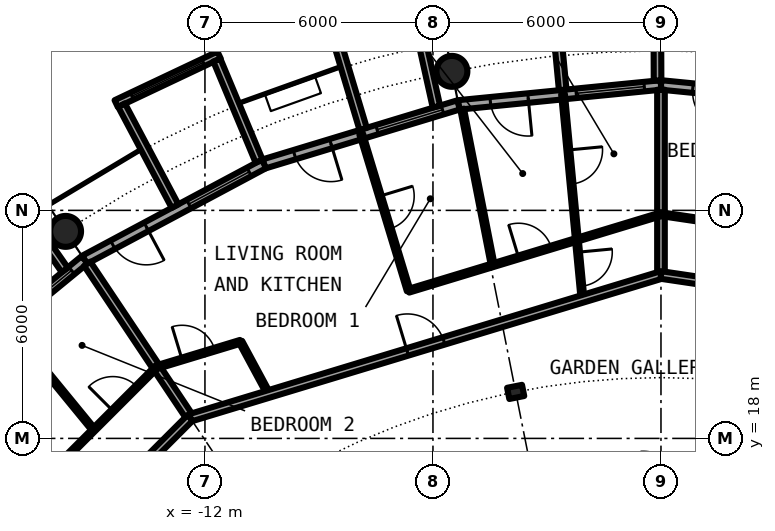
"""IFC4 building model, lengths in metres.
Left out: names, types, materials, properties, quantities, classifications, styles, units other than length and angle.
Written with IfcOpenShell. Run it as: python <this file> out.ifc"""

import sys

from ifc_helpers import new_model, si_unit, direction, frame, frame_2d, origin, origin_2d, place, context, subcontext, project, spatial, rectangle, circle, hollow_circle, i_section, extrude, element, fill, save


model = new_model("IFC4")
c1 = context("Model", 3, precision=1e-05, world=origin(), true_north=direction((0.0, 1.0)))
c2 = subcontext(c1, "Body", "Model", "MODEL_VIEW")
j1 = project(units=[si_unit("LENGTHUNIT", "METRE"), si_unit("PLANEANGLEUNIT", "RADIAN")], contexts=[c1])
p1 = place(None, origin())
s1 = spatial("IfcSite", under=j1, at=p1, CompositionType="ELEMENT")
p2 = place(p1, origin())
s2 = spatial("IfcBuilding", under=s1, at=p2, CompositionType="ELEMENT")
p3 = place(p2, frame((0.0, 0.0, 202.4)))
s3 = spatial("IfcBuildingStorey", under=s2, at=p3, CompositionType="ELEMENT", Elevation=202.4)
for number, where, z_axis, x_axis in (
    (1, (-5.501, 27.658, 0.0), (0.0, 0.0, 1.0), (1.0, 0.0, 0.0)),
    (2, (-15.667, 23.448, 0.0), (0.0, 0.0, 1.0), (1.0, 0.0, 0.0)),
):
    element("IfcColumn", number, at=place(p3, frame(where, z_axis=z_axis, x_axis=x_axis)), inside=s3, PredefinedType="COLUMN", context=c2, shape_type="SweptSolid", body=[
        extrude(hollow_circle(Radius=0.406, WallThickness=0.03, at=origin_2d()), origin(), (0.0, 0.0, 1.0), 3.05),
    ])
p4 = place(p3, frame((-3.824, 19.223, 0.0), z_axis=(0.0, 0.0, 1.0), x_axis=(-0.195090322016, 0.980785280403, 0.0)))
e3 = element("IfcColumn", 3, at=p4, inside=s3, PredefinedType="COLUMN", context=c2, shape_type="SweptSolid", body=[
    extrude(i_section(OverallWidth=0.3, OverallDepth=0.4, WebThickness=0.013, FlangeThickness=0.024, FilletRadius=0.027, at=origin_2d()), origin(), (0.0, 0.0, 1.0), 3.05),
])
p5 = place(p3, frame((5.326, 26.775, 0.0), z_axis=(0.0, 0.0, 1.0), x_axis=(-0.995173996315, 0.098126026407, 0.0)))
e4 = element("IfcWall", 4, at=p5, inside=s3, PredefinedType="SOLIDWALL", context=c2, shape_type="SweptSolid", body=[
    extrude(rectangle(XDim=5.352, YDim=0.25, at=frame_2d((2.676, 0.0))), origin(), (0.0, 0.0, 1.0), 2.7),
])
p6 = place(p5, frame((0.441, 0.0, 0.3)))
e5 = element("IfcOpeningElement", 5, at=p6, cuts=e4, PredefinedType="OPENING", context=c2, shape_type="SweptSolid", body=[
    extrude(rectangle(XDim=1.8, YDim=2.1, at=frame_2d((0.9, 1.05))), frame((0.0, 0.135, 0.0), z_axis=(0.0, -1.0, 0.0), x_axis=(1.0, 0.0, 0.0)), (0.0, 0.0, 1.0), 0.27),
])
p7 = place(p5, frame((3.51, 0.0, 0.0)))
e6 = element("IfcOpeningElement", 6, at=p7, cuts=e4, PredefinedType="OPENING", context=c2, shape_type="SweptSolid", body=[
    extrude(rectangle(XDim=1.0, YDim=2.2, at=frame_2d((0.5, 1.1))), frame((0.0, 0.135, 0.0), z_axis=(0.0, -1.0, 0.0), x_axis=(1.0, 0.0, 0.0)), (0.0, 0.0, 1.0), 0.27),
])
p8 = place(p3, frame((0.0, 27.3, 0.0), z_axis=(0.0, 0.0, 1.0), x_axis=(-0.995173996315, -0.098126026407, 0.0)))
e7 = element("IfcWall", 7, at=p8, inside=s3, PredefinedType="SOLIDWALL", context=c2, shape_type="SweptSolid", body=[
    extrude(rectangle(XDim=5.352, YDim=0.25, at=frame_2d((2.676, 0.0))), origin(), (0.0, 0.0, 1.0), 2.7),
])
p9 = place(p8, frame((0.441, 0.0, 0.3)))
e8 = element("IfcOpeningElement", 8, at=p9, cuts=e7, PredefinedType="OPENING", context=c2, shape_type="SweptSolid", body=[
    extrude(rectangle(XDim=1.8, YDim=2.1, at=frame_2d((0.9, 1.05))), frame((0.0, 0.135, 0.0), z_axis=(0.0, -1.0, 0.0), x_axis=(1.0, 0.0, 0.0)), (0.0, 0.0, 1.0), 0.27),
])
p10 = place(p8, frame((3.51, 0.0, 0.0)))
e9 = element("IfcOpeningElement", 9, at=p10, cuts=e7, PredefinedType="OPENING", context=c2, shape_type="SweptSolid", body=[
    extrude(rectangle(XDim=1.0, YDim=2.2, at=frame_2d((0.5, 1.1))), frame((0.0, 0.135, 0.0), z_axis=(0.0, -1.0, 0.0), x_axis=(1.0, 0.0, 0.0)), (0.0, 0.0, 1.0), 0.27),
])
p11 = place(p3, frame((-0.09, 27.417, -0.03), z_axis=(0.0, 0.0, 1.0), x_axis=(-0.00347308367, 0.999993968827, 0.0)))
e10 = element("IfcWall", 10, at=p11, inside=s3, PredefinedType="SOLIDWALL", context=c2, shape_type="SweptSolid", body=[
    extrude(rectangle(XDim=2.882, YDim=0.2, at=frame_2d((1.441, 0.0))), origin(), (0.0, 0.0, 1.0), 2.73),
])
p12 = place(p3, frame((-2.586, 27.171, -0.03), z_axis=(0.0, 0.0, 1.0), x_axis=(-0.094548432284, 0.995520262954, 0.0)))
e11 = element("IfcWall", 11, at=p12, inside=s3, PredefinedType="SOLIDWALL", context=c2, shape_type="SweptSolid", body=[
    extrude(rectangle(XDim=3.006, YDim=0.2, at=frame_2d((1.503, 0.0))), origin(), (0.0, 0.0, 1.0), 2.73),
])
p13 = place(p3, frame((-5.326, 26.775, 0.0), z_axis=(0.0, 0.0, 1.0), x_axis=(-0.956965678721, -0.290201119486, 0.0)))
e12 = element("IfcWall", 12, at=p13, inside=s3, PredefinedType="SOLIDWALL", context=c2, shape_type="SweptSolid", body=[
    extrude(rectangle(XDim=5.351, YDim=0.25, at=frame_2d((2.676, 0.0))), origin(), (0.0, 0.0, 1.0), 2.7),
])
p14 = place(p13, frame((0.441, 0.0, 0.3)))
e13 = element("IfcOpeningElement", 13, at=p14, cuts=e12, PredefinedType="OPENING", context=c2, shape_type="SweptSolid", body=[
    extrude(rectangle(XDim=1.8, YDim=2.1, at=frame_2d((0.9, 1.05))), frame((0.0, 0.135, 0.0), z_axis=(0.0, -1.0, 0.0), x_axis=(1.0, 0.0, 0.0)), (0.0, 0.0, 1.0), 0.27),
])
p15 = place(p13, frame((3.51, 0.0, 0.0)))
e14 = element("IfcOpeningElement", 14, at=p15, cuts=e12, PredefinedType="OPENING", context=c2, shape_type="SweptSolid", body=[
    extrude(rectangle(XDim=1.0, YDim=2.2, at=frame_2d((0.5, 1.1))), frame((0.0, 0.135, 0.0), z_axis=(0.0, -1.0, 0.0), x_axis=(1.0, 0.0, 0.0)), (0.0, 0.0, 1.0), 0.27),
])
p16 = place(p3, frame((-5.909, 26.729, -0.03), z_axis=(0.0, 0.0, 1.0), x_axis=(-0.216409053917, 0.976302781612, 0.0)))
e15 = element("IfcWall", 15, at=p16, inside=s3, PredefinedType="SOLIDWALL", context=c2, shape_type="SweptSolid", body=[
    extrude(rectangle(XDim=2.925, YDim=0.2, at=frame_2d((1.463, 0.0))), origin(), (0.0, 0.0, 1.0), 2.73),
])
p17 = place(p3, frame((-7.837, 26.144, -0.03), z_axis=(0.0, 0.0, 1.0), x_axis=(-0.287064767992, 0.957911174889, 0.0)))
e16 = element("IfcWall", 16, at=p17, inside=s3, PredefinedType="SOLIDWALL", context=c2, shape_type="SweptSolid", body=[
    extrude(rectangle(XDim=3.006, YDim=0.2, at=frame_2d((1.503, 0.0))), origin(), (0.0, 0.0, 1.0), 2.73),
])
p18 = place(p3, frame((-10.447, 25.222, 0.0), z_axis=(0.0, 0.0, 1.0), x_axis=(-0.881915646801, -0.471407246368, 0.0)))
e17 = element("IfcWall", 17, at=p18, inside=s3, PredefinedType="SOLIDWALL", context=c2, shape_type="SweptSolid", body=[
    extrude(rectangle(XDim=5.352, YDim=0.25, at=frame_2d((2.676, 0.0))), origin(), (0.0, 0.0, 1.0), 2.7),
])
p19 = place(p18, frame((0.441, 0.0, 0.3)))
e18 = element("IfcOpeningElement", 18, at=p19, cuts=e17, PredefinedType="OPENING", context=c2, shape_type="SweptSolid", body=[
    extrude(rectangle(XDim=1.8, YDim=2.1, at=frame_2d((0.9, 1.05))), frame((0.0, 0.135, 0.0), z_axis=(0.0, -1.0, 0.0), x_axis=(1.0, 0.0, 0.0)), (0.0, 0.0, 1.0), 0.27),
])
p20 = place(p18, frame((3.51, 0.0, 0.0)))
e19 = element("IfcOpeningElement", 19, at=p20, cuts=e17, PredefinedType="OPENING", context=c2, shape_type="SweptSolid", body=[
    extrude(rectangle(XDim=1.0, YDim=2.2, at=frame_2d((0.5, 1.1))), frame((0.0, 0.135, 0.0), z_axis=(0.0, -1.0, 0.0), x_axis=(1.0, 0.0, 0.0)), (0.0, 0.0, 1.0), 0.27),
])
p21 = place(p3, frame((-11.629, 28.088, -0.03), z_axis=(0.0, 0.0, 1.0), x_axis=(-0.904000060331, -0.427532327342, 0.0)))
e20 = element("IfcWall", 20, at=p21, inside=s3, PredefinedType="SOLIDWALL", context=c2, shape_type="SweptSolid", body=[
    extrude(rectangle(XDim=2.993, YDim=0.2, at=frame_2d((1.497, 0.0))), origin(), (0.0, 0.0, 1.0), 2.73),
])
p22 = place(p21, frame((0.457, 0.0, 0.33)))
e21 = element("IfcOpeningElement", 21, at=p22, cuts=e20, PredefinedType="OPENING", context=c2, shape_type="SweptSolid", body=[
    extrude(circle(Radius=1.04, at=frame_2d((1.04, 1.04))), frame((0.0, 0.11, 0.0), z_axis=(0.0, -1.0, 0.0), x_axis=(1.0, 0.0, 0.0)), (0.0, 0.0, 1.0), 0.22),
])
p23 = place(p3, frame((-10.575, 25.295, -0.03), z_axis=(0.0, 0.0, 1.0), x_axis=(-0.385697364644, 0.922625353492, 0.0)))
e22 = element("IfcWall", 22, at=p23, inside=s3, PredefinedType="SOLIDWALL", context=c2, shape_type="SweptSolid", body=[
    extrude(rectangle(XDim=2.883, YDim=0.2, at=frame_2d((1.442, 0.0))), origin(), (0.0, 0.0, 1.0), 2.73),
])
p24 = place(p3, frame((-12.787, 24.113, -0.03), z_axis=(0.0, 0.0, 1.0), x_axis=(-0.468365282436, 0.883534924159, 0.0)))
e23 = element("IfcWall", 23, at=p24, inside=s3, PredefinedType="SOLIDWALL", context=c2, shape_type="SweptSolid", body=[
    extrude(rectangle(XDim=3.006, YDim=0.2, at=frame_2d((1.503, 0.0))), origin(), (0.0, 0.0, 1.0), 2.73),
])
p25 = place(p3, frame((-15.167, 22.699, 0.0), z_axis=(0.0, 0.0, 1.0), x_axis=(-0.773019449054, -0.634382322723, 0.0)))
e24 = element("IfcWall", 24, at=p25, inside=s3, PredefinedType="SOLIDWALL", context=c2, shape_type="SweptSolid", body=[
    extrude(rectangle(XDim=5.352, YDim=0.25, at=frame_2d((2.676, 0.0))), origin(), (0.0, 0.0, 1.0), 2.7),
])
p26 = place(p25, frame((0.441, 0.0, 0.3)))
e25 = element("IfcOpeningElement", 25, at=p26, cuts=e24, PredefinedType="OPENING", context=c2, shape_type="SweptSolid", body=[
    extrude(rectangle(XDim=1.8, YDim=2.1, at=frame_2d((0.9, 1.05))), frame((0.0, 0.135, 0.0), z_axis=(0.0, -1.0, 0.0), x_axis=(1.0, 0.0, 0.0)), (0.0, 0.0, 1.0), 0.27),
])
p27 = place(p25, frame((3.51, 0.0, 0.0)))
e26 = element("IfcOpeningElement", 26, at=p27, cuts=e24, PredefinedType="OPENING", context=c2, shape_type="SweptSolid", body=[
    extrude(rectangle(XDim=1.0, YDim=2.2, at=frame_2d((0.5, 1.1))), frame((0.0, 0.135, 0.0), z_axis=(0.0, -1.0, 0.0), x_axis=(1.0, 0.0, 0.0)), (0.0, 0.0, 1.0), 0.27),
])
p28 = place(p3, frame((-15.688, 22.433, -0.03), z_axis=(0.0, 0.0, 1.0), x_axis=(-0.573260687834, 0.819373043115, 0.0)))
e27 = element("IfcWall", 27, at=p28, inside=s3, PredefinedType="SOLIDWALL", context=c2, shape_type="SweptSolid", body=[
    extrude(rectangle(XDim=2.925, YDim=0.2, at=frame_2d((1.463, 0.0))), origin(), (0.0, 0.0, 1.0), 2.73),
])
p29 = place(p3, frame((-17.22, 21.023, 0.0), z_axis=(0.0, 0.0, 1.0), x_axis=(0.633737383709, -0.773548271597, 0.0)))
e28 = element("IfcWall", 28, at=p29, inside=s3, PredefinedType="PARTITIONING", context=c2, shape_type="SweptSolid", body=[
    extrude(rectangle(XDim=3.618, YDim=0.1, at=frame_2d((1.809, 0.0))), origin(), (0.0, 0.0, 1.0), 2.7),
])
p30 = place(p3, frame((-15.098, 22.595, 0.0), z_axis=(0.0, 0.0, 1.0), x_axis=(0.55569370664, -0.831387096605, 0.0)))
e29 = element("IfcWall", 29, at=p30, inside=s3, PredefinedType="PARTITIONING", context=c2, shape_type="SweptSolid", body=[
    extrude(rectangle(XDim=4.875, YDim=0.2, at=frame_2d((2.438, 0.0))), origin(), (0.0, 0.0, 1.0), 2.7),
])
p31 = place(p3, frame((-7.888, 26.005, 0.0), z_axis=(0.0, 0.0, 1.0), x_axis=(0.290193157742, -0.956968093094, 0.0)))
e30 = element("IfcWall", 30, at=p31, inside=s3, PredefinedType="PARTITIONING", context=c2, shape_type="SweptSolid", body=[
    extrude(rectangle(XDim=4.304, YDim=0.1, at=frame_2d((2.152, 0.0))), origin(), (0.0, 0.0, 1.0), 2.7),
])
p32 = place(p31, frame((1.702, 0.0, 0.0)))
e31 = element("IfcOpeningElement", 31, at=p32, cuts=e30, PredefinedType="OPENING", context=c2, shape_type="SweptSolid", body=[
    extrude(rectangle(XDim=0.9, YDim=2.3, at=frame_2d((0.45, 1.15))), frame((0.0, 0.06, 0.0), z_axis=(0.0, -1.0, 0.0), x_axis=(1.0, 0.0, 0.0)), (0.0, 0.0, 1.0), 0.12),
])
p33 = place(p3, frame((-5.232, 26.667, 0.0), z_axis=(0.0, 0.0, 1.0), x_axis=(0.192415561348, -0.981313533867, 0.0)))
e32 = element("IfcWall", 32, at=p33, inside=s3, PredefinedType="PARTITIONING", context=c2, shape_type="SweptSolid", body=[
    extrude(rectangle(XDim=4.188, YDim=0.1, at=frame_2d((2.094, 0.0))), origin(), (0.0, 0.0, 1.0), 2.7),
])
p34 = place(p3, frame((-2.577, 27.053, 0.0), z_axis=(0.0, 0.0, 1.0), x_axis=(0.094751520537, -0.99550095397, 0.0)))
e33 = element("IfcWall", 33, at=p34, inside=s3, PredefinedType="PARTITIONING", context=c2, shape_type="SweptSolid", body=[
    extrude(rectangle(XDim=5.403, YDim=0.1, at=frame_2d((2.702, 0.0))), origin(), (0.0, 0.0, 1.0), 2.7),
])
p35 = place(p34, frame((4.172, 0.0, 0.0)))
e34 = element("IfcOpeningElement", 34, at=p35, cuts=e33, PredefinedType="OPENING", context=c2, shape_type="SweptSolid", body=[
    extrude(rectangle(XDim=0.9, YDim=2.3, at=frame_2d((0.45, 1.15))), frame((0.0, 0.06, 0.0), z_axis=(0.0, -1.0, 0.0), x_axis=(1.0, 0.0, 0.0)), (0.0, 0.0, 1.0), 0.12),
])
p36 = place(p34, frame((1.471, 0.0, 0.0)))
e35 = element("IfcOpeningElement", 35, at=p36, cuts=e33, PredefinedType="OPENING", context=c2, shape_type="SweptSolid", body=[
    extrude(rectangle(XDim=0.9, YDim=2.3, at=frame_2d((0.45, 1.15))), frame((0.0, 0.06, 0.0), z_axis=(0.0, -1.0, 0.0), x_axis=(1.0, 0.0, 0.0)), (0.0, 0.0, 1.0), 0.12),
])
p37 = place(p3, frame((0.0, 22.3, 0.0), z_axis=(0.0, 0.0, 1.0), x_axis=(0.0, 1.0, 0.0)))
e36 = element("IfcWall", 36, at=p37, inside=s3, PredefinedType="PARTITIONING", context=c2, shape_type="SweptSolid", body=[
    extrude(rectangle(XDim=4.875, YDim=0.2, at=frame_2d((2.438, 0.0))), origin(), (0.0, 0.0, 1.0), 2.7),
])
p38 = place(p3, frame((-11.065, 20.543, 0.0), z_axis=(0.0, 0.0, 1.0), x_axis=(0.474388748528, -0.880315463496, 0.0)))
e37 = element("IfcWall", 37, at=p38, inside=s3, PredefinedType="PARTITIONING", context=c2, shape_type="SweptSolid", body=[
    extrude(rectangle(XDim=1.562, YDim=0.1, at=frame_2d((0.781, 0.0))), origin(), (0.0, 0.0, 1.0), 2.7),
])
p39 = place(p3, frame((-12.389, 18.542, 0.0), z_axis=(0.0, 0.0, 1.0), x_axis=(0.956994750783, 0.290105234311, 0.0)))
e38 = element("IfcWall", 38, at=p39, inside=s3, PredefinedType="PARTITIONING", context=c2, shape_type="SweptSolid", body=[
    extrude(rectangle(XDim=12.951, YDim=0.2, at=frame_2d((6.475, 0.0))), origin(), (0.0, 0.0, 1.0), 2.7),
])
p40 = place(p39, frame((5.974, 0.0, 0.0)))
e39 = element("IfcOpeningElement", 39, at=p40, cuts=e38, PredefinedType="OPENING", context=c2, shape_type="SweptSolid", body=[
    extrude(rectangle(XDim=1.0, YDim=2.3, at=frame_2d((0.5, 1.15))), frame((0.0, 0.11, 0.0), z_axis=(0.0, -1.0, 0.0), x_axis=(1.0, 0.0, 0.0)), (0.0, 0.0, 1.0), 0.22),
])
p41 = place(p3, frame((-18.542, 12.389, 0.0), z_axis=(0.0, 0.0, 1.0), x_axis=(0.707106781187, 0.707106781187, 0.0)))
e40 = element("IfcWall", 40, at=p41, inside=s3, PredefinedType="PARTITIONING", context=c2, shape_type="SweptSolid", body=[
    extrude(rectangle(XDim=8.702, YDim=0.2, at=frame_2d((4.351, 0.0))), origin(), (0.0, 0.0, 1.0), 2.7),
])
p42 = place(p41, frame((4.938, 0.0, 0.0)))
e41 = element("IfcOpeningElement", 41, at=p42, cuts=e40, PredefinedType="OPENING", context=c2, shape_type="SweptSolid", body=[
    extrude(rectangle(XDim=1.0, YDim=2.3, at=frame_2d((0.5, 1.15))), frame((0.0, 0.11, 0.0), z_axis=(0.0, -1.0, 0.0), x_axis=(1.0, 0.0, 0.0)), (0.0, 0.0, 1.0), 0.22),
])
p43 = place(p3, frame((0.0, 22.3, 0.0), z_axis=(0.0, 0.0, 1.0), x_axis=(0.989181015112, -0.146700100005, 0.0)))
e42 = element("IfcWall", 42, at=p43, inside=s3, PredefinedType="PARTITIONING", context=c2, shape_type="SweptSolid", body=[
    extrude(rectangle(XDim=6.544, YDim=0.2, at=frame_2d((3.272, 0.0))), origin(), (0.0, 0.0, 1.0), 2.7),
])
p44 = place(p43, frame((1.682, 0.0, 0.0)))
e43 = element("IfcOpeningElement", 43, at=p44, cuts=e42, PredefinedType="OPENING", context=c2, shape_type="SweptSolid", body=[
    extrude(rectangle(XDim=1.0, YDim=2.3, at=frame_2d((0.5, 1.15))), frame((0.0, 0.11, 0.0), z_axis=(0.0, -1.0, 0.0), x_axis=(1.0, 0.0, 0.0)), (0.0, 0.0, 1.0), 0.22),
])
p45 = place(p3, frame((-13.278, 19.872, 0.0), z_axis=(0.0, 0.0, 1.0), x_axis=(0.956994210955, 0.29010701508, 0.0)))
e44 = element("IfcWall", 44, at=p45, inside=s3, PredefinedType="PARTITIONING", context=c2, shape_type="SweptSolid", body=[
    extrude(rectangle(XDim=2.312, YDim=0.1, at=frame_2d((1.156, 0.0))), origin(), (0.0, 0.0, 1.0), 2.7),
])
p46 = place(p45, frame((0.706, 0.0, 0.0)))
e45 = element("IfcOpeningElement", 45, at=p46, cuts=e44, PredefinedType="OPENING", context=c2, shape_type="SweptSolid", body=[
    extrude(rectangle(XDim=0.9, YDim=2.3, at=frame_2d((0.45, 1.15))), frame((0.0, 0.06, 0.0), z_axis=(0.0, -1.0, 0.0), x_axis=(1.0, 0.0, 0.0)), (0.0, 0.0, 1.0), 0.12),
])
p47 = place(p3, frame((-6.639, 21.885, 0.0), z_axis=(0.0, 0.0, 1.0), x_axis=(0.956990364662, 0.290119702785, 0.0)))
e46 = element("IfcWall", 46, at=p47, inside=s3, PredefinedType="PARTITIONING", context=c2, shape_type="SweptSolid", body=[
    extrude(rectangle(XDim=6.938, YDim=0.1, at=frame_2d((3.469, 0.0))), origin(), (0.0, 0.0, 1.0), 2.7),
])
p48 = place(p47, frame((3.022, 0.0, 0.0)))
e47 = element("IfcOpeningElement", 47, at=p48, cuts=e46, PredefinedType="OPENING", context=c2, shape_type="SweptSolid", body=[
    extrude(rectangle(XDim=0.9, YDim=2.3, at=frame_2d((0.45, 1.15))), frame((0.0, 0.06, 0.0), z_axis=(0.0, -1.0, 0.0), x_axis=(1.0, 0.0, 0.0)), (0.0, 0.0, 1.0), 0.12),
])
p49 = place(p3, frame((-16.575, 16.575, 0.0), z_axis=(0.0, 0.0, 1.0), x_axis=(0.707080600289, 0.707132961115, 0.0)))
e48 = element("IfcWall", 48, at=p49, inside=s3, PredefinedType="PARTITIONING", context=c2, shape_type="SweptSolid", body=[
    extrude(rectangle(XDim=4.663, YDim=0.1, at=frame_2d((2.331, 0.0))), origin(), (0.0, 0.0, 1.0), 2.7),
])
p50 = place(p49, frame((3.043, 0.0, 0.0)))
e49 = element("IfcOpeningElement", 49, at=p50, cuts=e48, PredefinedType="OPENING", context=c2, shape_type="SweptSolid", body=[
    extrude(rectangle(XDim=0.9, YDim=2.3, at=frame_2d((0.45, 1.15))), frame((0.0, 0.06, 0.0), z_axis=(0.0, -1.0, 0.0), x_axis=(1.0, 0.0, 0.0)), (0.0, 0.0, 1.0), 0.12),
])
p51 = place(p3, frame((0.0, 23.9, 0.0), z_axis=(0.0, 0.0, 1.0), x_axis=(0.989181588285, -0.146696235121, 0.0)))
e50 = element("IfcWall", 50, at=p51, inside=s3, PredefinedType="PARTITIONING", context=c2, shape_type="SweptSolid", body=[
    extrude(rectangle(XDim=2.338, YDim=0.1, at=frame_2d((1.169, 0.0))), origin(), (0.0, 0.0, 1.0), 2.7),
])
p52 = place(p7, origin())
e51 = element("IfcDoor", 51, at=p52, inside=s3, OperationType="SINGLE_SWING_LEFT", PredefinedType="DOOR", context=c2, shape_type="SweptSolid", body=[
    extrude(rectangle(XDim=1.0, YDim=2.2, at=frame_2d((0.5, 1.1))), frame((0.0, 0.025, 0.0), z_axis=(0.0, -1.0, 0.0), x_axis=(1.0, 0.0, 0.0)), (0.0, 0.0, 1.0), 0.05),
])
fill(e6, e51)
p53 = place(p9, origin())
e52 = element("IfcWindow", 52, at=p53, inside=s3, PartitioningType="SINGLE_PANEL", PredefinedType="WINDOW", context=c2, shape_type="SweptSolid", body=[
    extrude(rectangle(XDim=1.8, YDim=2.1, at=frame_2d((0.9, 1.05))), frame((0.0, 0.03, 0.0), z_axis=(0.0, -1.0, 0.0), x_axis=(1.0, 0.0, 0.0)), (0.0, 0.0, 1.0), 0.06),
])
fill(e8, e52)
p54 = place(p10, origin())
e53 = element("IfcDoor", 53, at=p54, inside=s3, OperationType="SINGLE_SWING_LEFT", PredefinedType="DOOR", context=c2, shape_type="SweptSolid", body=[
    extrude(rectangle(XDim=1.0, YDim=2.2, at=frame_2d((0.5, 1.1))), frame((0.0, 0.025, 0.0), z_axis=(0.0, -1.0, 0.0), x_axis=(1.0, 0.0, 0.0)), (0.0, 0.0, 1.0), 0.05),
])
fill(e9, e53)
p55 = place(p14, origin())
e54 = element("IfcWindow", 54, at=p55, inside=s3, PartitioningType="SINGLE_PANEL", PredefinedType="WINDOW", context=c2, shape_type="SweptSolid", body=[
    extrude(rectangle(XDim=1.8, YDim=2.1, at=frame_2d((0.9, 1.05))), frame((0.0, 0.03, 0.0), z_axis=(0.0, -1.0, 0.0), x_axis=(1.0, 0.0, 0.0)), (0.0, 0.0, 1.0), 0.06),
])
fill(e13, e54)
p56 = place(p15, origin())
e55 = element("IfcDoor", 55, at=p56, inside=s3, OperationType="SINGLE_SWING_LEFT", PredefinedType="DOOR", context=c2, shape_type="SweptSolid", body=[
    extrude(rectangle(XDim=1.0, YDim=2.2, at=frame_2d((0.5, 1.1))), frame((0.0, 0.025, 0.0), z_axis=(0.0, -1.0, 0.0), x_axis=(1.0, 0.0, 0.0)), (0.0, 0.0, 1.0), 0.05),
])
fill(e14, e55)
p57 = place(p19, origin())
e56 = element("IfcWindow", 56, at=p57, inside=s3, PartitioningType="SINGLE_PANEL", PredefinedType="WINDOW", context=c2, shape_type="SweptSolid", body=[
    extrude(rectangle(XDim=1.8, YDim=2.1, at=frame_2d((0.9, 1.05))), frame((0.0, 0.03, 0.0), z_axis=(0.0, -1.0, 0.0), x_axis=(1.0, 0.0, 0.0)), (0.0, 0.0, 1.0), 0.06),
])
fill(e18, e56)
p58 = place(p22, origin())
e57 = element("IfcWindow", 57, at=p58, inside=s3, PartitioningType="SINGLE_PANEL", PredefinedType="WINDOW", context=c2, shape_type="SweptSolid", body=[
    extrude(circle(Radius=1.04, at=frame_2d((1.04, 1.04))), frame((0.0, 0.03, 0.0), z_axis=(0.0, -1.0, 0.0), x_axis=(1.0, 0.0, 0.0)), (0.0, 0.0, 1.0), 0.06),
])
fill(e21, e57)
p59 = place(p20, origin())
e58 = element("IfcDoor", 58, at=p59, inside=s3, OperationType="SINGLE_SWING_LEFT", PredefinedType="DOOR", context=c2, shape_type="SweptSolid", body=[
    extrude(rectangle(XDim=1.0, YDim=2.2, at=frame_2d((0.5, 1.1))), frame((0.0, 0.025, 0.0), z_axis=(0.0, -1.0, 0.0), x_axis=(1.0, 0.0, 0.0)), (0.0, 0.0, 1.0), 0.05),
])
fill(e19, e58)
p60 = place(p26, origin())
e59 = element("IfcWindow", 59, at=p60, inside=s3, PartitioningType="SINGLE_PANEL", PredefinedType="WINDOW", context=c2, shape_type="SweptSolid", body=[
    extrude(rectangle(XDim=1.8, YDim=2.1, at=frame_2d((0.9, 1.05))), frame((0.0, 0.03, 0.0), z_axis=(0.0, -1.0, 0.0), x_axis=(1.0, 0.0, 0.0)), (0.0, 0.0, 1.0), 0.06),
])
fill(e25, e59)
p61 = place(p40, origin())
e60 = element("IfcDoor", 60, at=p61, inside=s3, OperationType="SINGLE_SWING_LEFT", PredefinedType="DOOR", context=c2, shape_type="SweptSolid", body=[
    extrude(rectangle(XDim=1.0, YDim=2.3, at=frame_2d((0.5, 1.15))), frame((0.0, 0.025, 0.0), z_axis=(0.0, -1.0, 0.0), x_axis=(1.0, 0.0, 0.0)), (0.0, 0.0, 1.0), 0.05),
])
fill(e39, e60)
p62 = place(p46, origin())
e61 = element("IfcDoor", 61, at=p62, inside=s3, OperationType="SINGLE_SWING_LEFT", PredefinedType="DOOR", context=c2, shape_type="SweptSolid", body=[
    extrude(rectangle(XDim=0.9, YDim=2.3, at=frame_2d((0.45, 1.15))), frame((0.0, 0.025, 0.0), z_axis=(0.0, -1.0, 0.0), x_axis=(1.0, 0.0, 0.0)), (0.0, 0.0, 1.0), 0.05),
])
fill(e45, e61)
p63 = place(p35, origin())
e62 = element("IfcDoor", 62, at=p63, inside=s3, OperationType="SINGLE_SWING_RIGHT", PredefinedType="DOOR", context=c2, shape_type="SweptSolid", body=[
    extrude(rectangle(XDim=0.9, YDim=2.3, at=frame_2d((0.45, 1.15))), frame((0.0, 0.025, 0.0), z_axis=(0.0, -1.0, 0.0), x_axis=(1.0, 0.0, 0.0)), (0.0, 0.0, 1.0), 0.05),
])
fill(e34, e62)
p64 = place(p32, origin())
e63 = element("IfcDoor", 63, at=p64, inside=s3, OperationType="SINGLE_SWING_LEFT", PredefinedType="DOOR", context=c2, shape_type="SweptSolid", body=[
    extrude(rectangle(XDim=0.9, YDim=2.3, at=frame_2d((0.45, 1.15))), frame((0.0, 0.025, 0.0), z_axis=(0.0, -1.0, 0.0), x_axis=(1.0, 0.0, 0.0)), (0.0, 0.0, 1.0), 0.05),
])
fill(e31, e63)
p65 = place(p48, origin())
e64 = element("IfcDoor", 64, at=p65, inside=s3, OperationType="SINGLE_SWING_RIGHT", PredefinedType="DOOR", context=c2, shape_type="SweptSolid", body=[
    extrude(rectangle(XDim=0.9, YDim=2.3, at=frame_2d((0.45, 1.15))), frame((0.0, 0.025, 0.0), z_axis=(0.0, -1.0, 0.0), x_axis=(1.0, 0.0, 0.0)), (0.0, 0.0, 1.0), 0.05),
])
fill(e47, e64)
p66 = place(p36, origin())
e65 = element("IfcDoor", 65, at=p66, inside=s3, OperationType="SINGLE_SWING_LEFT", PredefinedType="DOOR", context=c2, shape_type="SweptSolid", body=[
    extrude(rectangle(XDim=0.9, YDim=2.3, at=frame_2d((0.45, 1.15))), frame((0.0, 0.025, 0.0), z_axis=(0.0, -1.0, 0.0), x_axis=(1.0, 0.0, 0.0)), (0.0, 0.0, 1.0), 0.05),
])
fill(e35, e65)
p67 = place(p50, origin())
e66 = element("IfcDoor", 66, at=p67, inside=s3, OperationType="SINGLE_SWING_RIGHT", PredefinedType="DOOR", context=c2, shape_type="SweptSolid", body=[
    extrude(rectangle(XDim=0.9, YDim=2.3, at=frame_2d((0.45, 1.15))), frame((0.0, 0.025, 0.0), z_axis=(0.0, -1.0, 0.0), x_axis=(1.0, 0.0, 0.0)), (0.0, 0.0, 1.0), 0.05),
])
fill(e49, e66)
save(model, sys.argv[1])
